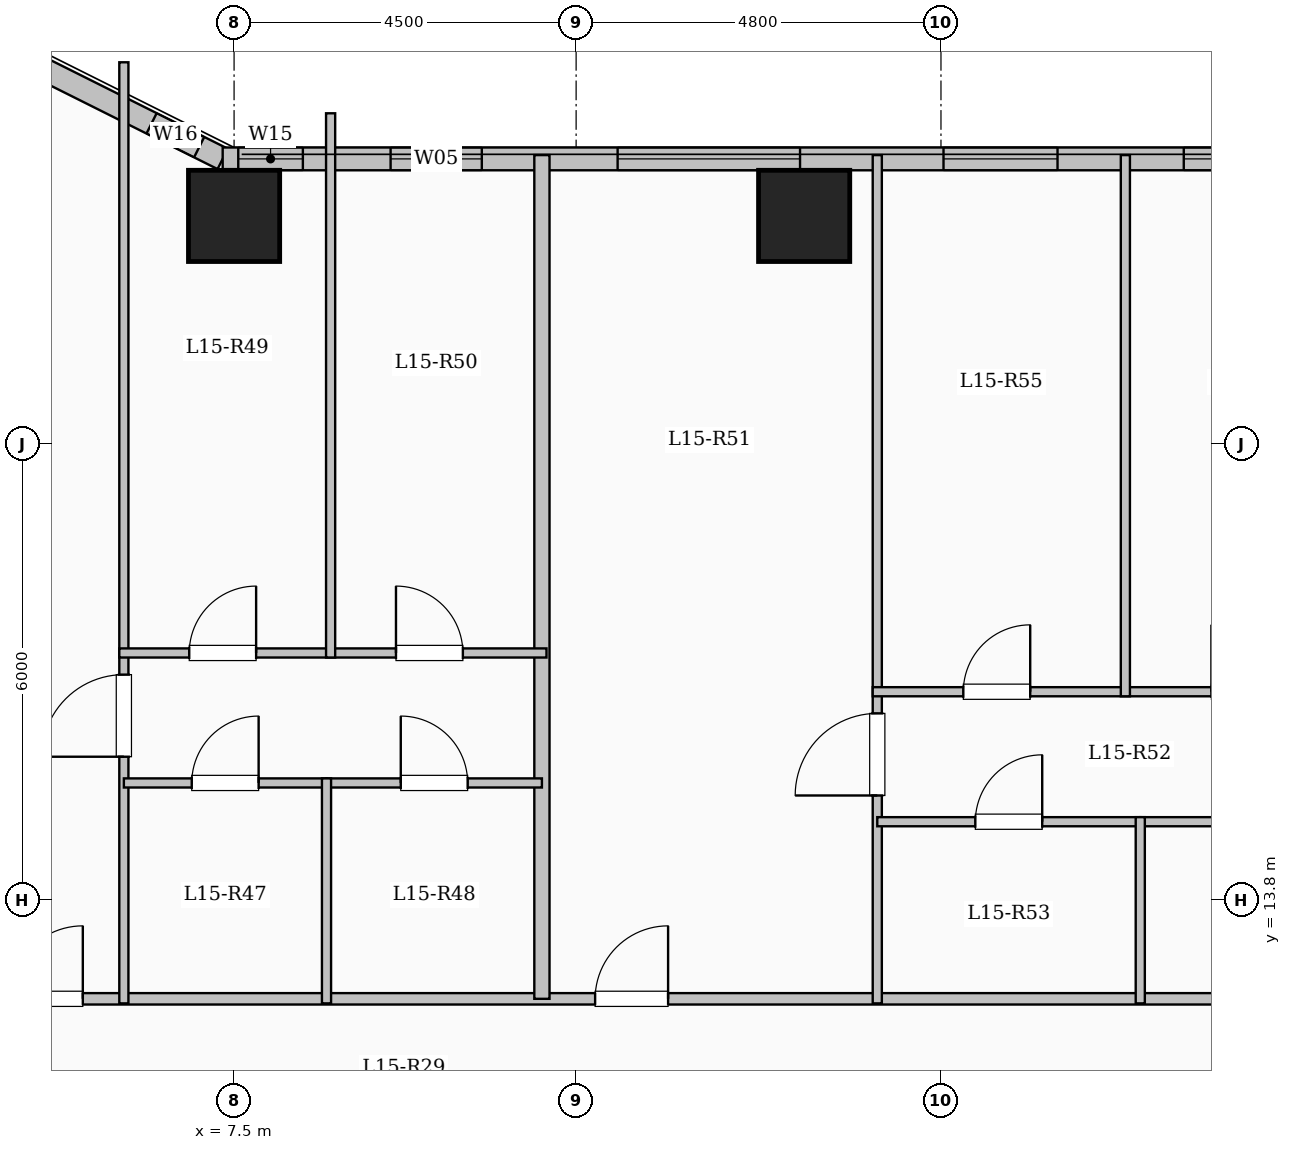
"""IFC4 building model, lengths in metres.
Left out: names, types, materials, properties, quantities, classifications, styles, units other than length and angle.
Written with IfcOpenShell. Run it as: python <this file> out.ifc"""

import sys

from ifc_helpers import new_model, si_unit, direction, frame, frame_2d, origin, origin_2d, place, context, subcontext, project, spatial, rectangle, extrude, element, fill, save


model = new_model("IFC4")
c1 = context("Model", 3, precision=1e-05, world=origin(), true_north=direction((0.0, 1.0)))
c2 = subcontext(c1, "Body", "Model", "MODEL_VIEW")
j1 = project(units=[si_unit("LENGTHUNIT", "METRE"), si_unit("PLANEANGLEUNIT", "RADIAN")], contexts=[c1])
p1 = place(None, origin())
s1 = spatial("IfcSite", under=j1, at=p1, CompositionType="ELEMENT")
p2 = place(p1, origin())
s2 = spatial("IfcBuilding", under=s1, at=p2, CompositionType="ELEMENT")
p3 = place(p2, frame((0.0, 0.0, 57.5)))
s3 = spatial("IfcBuildingStorey", under=s2, at=p3, CompositionType="ELEMENT", Elevation=57.5)
for number, where, z_axis, x_axis in (
    (1, (7.5, 22.8, 0.0), (0.0, 0.0, 1.0), (1.0, 0.0, 0.0)),
    (2, (15.0, 22.8, 0.0), (0.0, 0.0, 1.0), (1.0, 0.0, 0.0)),
):
    element("IfcColumn", number, at=place(p3, frame(where, z_axis=z_axis, x_axis=x_axis)), inside=s3, PredefinedType="COLUMN", context=c2, shape_type="SweptSolid", body=[
        extrude(rectangle(XDim=1.2, YDim=1.2, at=origin_2d()), origin(), (0.0, 0.0, 1.0), 3.35),
    ])
p4 = place(p3, frame((4.35, 25.05, 0.0), z_axis=(0.0, 0.0, 1.0), x_axis=(0.894427191, -0.4472135955, 0.0)))
e3 = element("IfcWall", 3, at=p4, inside=s3, PredefinedType="SOLIDWALL", context=c2, shape_type="SweptSolid", body=[
    extrude(rectangle(XDim=3.354, YDim=0.3, at=frame_2d((1.677, 0.0))), origin(), (0.0, 0.0, 1.0), 3.1),
])
p5 = place(p4, frame((2.308, 0.0, 0.95)))
e4 = element("IfcOpeningElement", 4, at=p5, cuts=e3, PredefinedType="OPENING", context=c2, shape_type="SweptSolid", body=[
    extrude(rectangle(XDim=0.7, YDim=1.5, at=frame_2d((0.35, 0.75))), frame((0.0, 0.16, 0.0), z_axis=(0.0, -1.0, 0.0), x_axis=(1.0, 0.0, 0.0)), (0.0, 0.0, 1.0), 0.32),
])
p6 = place(p3, frame((7.35, 23.55, 0.0), z_axis=(0.0, 0.0, 1.0), x_axis=(1.0, 0.0, 0.0)))
e5 = element("IfcWall", 5, at=p6, inside=s3, PredefinedType="SOLIDWALL", context=c2, shape_type="SweptSolid", body=[
    extrude(rectangle(XDim=15.3, YDim=0.3, at=frame_2d((7.65, 0.0))), origin(), (0.0, 0.0, 1.0), 3.1),
])
p7 = place(p6, frame((0.205, 0.0, 0.95)))
e6 = element("IfcOpeningElement", 6, at=p7, cuts=e5, PredefinedType="OPENING", context=c2, shape_type="SweptSolid", body=[
    extrude(rectangle(XDim=0.85, YDim=1.5, at=frame_2d((0.425, 0.75))), frame((0.0, 0.16, 0.0), z_axis=(0.0, -1.0, 0.0), x_axis=(1.0, 0.0, 0.0)), (0.0, 0.0, 1.0), 0.32),
])
p8 = place(p6, frame((2.209, 0.0, 0.95)))
e7 = element("IfcOpeningElement", 7, at=p8, cuts=e5, PredefinedType="OPENING", context=c2, shape_type="SweptSolid", body=[
    extrude(rectangle(XDim=1.2, YDim=1.5, at=frame_2d((0.6, 0.75))), frame((0.0, 0.16, 0.0), z_axis=(0.0, -1.0, 0.0), x_axis=(1.0, 0.0, 0.0)), (0.0, 0.0, 1.0), 0.32),
])
p9 = place(p6, frame((5.196, 0.0, 0.9)))
e8 = element("IfcOpeningElement", 8, at=p9, cuts=e5, PredefinedType="OPENING", context=c2, shape_type="SweptSolid", body=[
    extrude(rectangle(XDim=2.4, YDim=1.8, at=frame_2d((1.2, 0.9))), frame((0.0, 0.16, 0.0), z_axis=(0.0, -1.0, 0.0), x_axis=(1.0, 0.0, 0.0)), (0.0, 0.0, 1.0), 0.32),
])
p10 = place(p6, frame((9.483, 0.0, 0.9)))
e9 = element("IfcOpeningElement", 9, at=p10, cuts=e5, PredefinedType="OPENING", context=c2, shape_type="SweptSolid", body=[
    extrude(rectangle(XDim=1.5, YDim=1.65, at=frame_2d((0.75, 0.825))), frame((0.0, 0.16, 0.0), z_axis=(0.0, -1.0, 0.0), x_axis=(1.0, 0.0, 0.0)), (0.0, 0.0, 1.0), 0.32),
])
p11 = place(p6, frame((12.644, 0.0, 0.9)))
e10 = element("IfcOpeningElement", 10, at=p11, cuts=e5, PredefinedType="OPENING", context=c2, shape_type="SweptSolid", body=[
    extrude(rectangle(XDim=1.8, YDim=1.65, at=frame_2d((0.9, 0.825))), frame((0.0, 0.16, 0.0), z_axis=(0.0, -1.0, 0.0), x_axis=(1.0, 0.0, 0.0)), (0.0, 0.0, 1.0), 0.32),
])
p12 = place(p3, frame((3.85, 12.5, 0.0), z_axis=(0.0, 0.0, 1.0), x_axis=(1.0, 0.0, 0.0)))
e11 = element("IfcWall", 11, at=p12, inside=s3, PredefinedType="PARTITIONING", context=c2, shape_type="SweptSolid", body=[
    extrude(rectangle(XDim=18.7, YDim=0.15, at=frame_2d((9.35, 0.0))), origin(), (0.0, 0.0, 1.0), 3.1),
])
p13 = place(p12, frame((0.7, 0.0, 0.0)))
e12 = element("IfcOpeningElement", 12, at=p13, cuts=e11, PredefinedType="OPENING", context=c2, shape_type="SweptSolid", body=[
    extrude(rectangle(XDim=0.96, YDim=2.15, at=frame_2d((0.48, 1.075))), frame((0.0, 0.085, 0.0), z_axis=(0.0, -1.0, 0.0), x_axis=(1.0, 0.0, 0.0)), (0.0, 0.0, 1.0), 0.17),
])
p14 = place(p12, frame((8.4, 0.0, 0.0)))
e13 = element("IfcOpeningElement", 13, at=p14, cuts=e11, PredefinedType="OPENING", context=c2, shape_type="SweptSolid", body=[
    extrude(rectangle(XDim=0.96, YDim=2.15, at=frame_2d((0.48, 1.075))), frame((0.0, 0.085, 0.0), z_axis=(0.0, -1.0, 0.0), x_axis=(1.0, 0.0, 0.0)), (0.0, 0.0, 1.0), 0.17),
])
p15 = place(p3, frame((11.55, 12.5, 0.0), z_axis=(0.0, 0.0, 1.0), x_axis=(0.0, 1.0, 0.0)))
e14 = element("IfcWall", 14, at=p15, inside=s3, PredefinedType="SOLIDWALL", context=c2, shape_type="SweptSolid", body=[
    extrude(rectangle(XDim=11.1, YDim=0.2, at=frame_2d((5.55, 0.0))), origin(), (0.0, 0.0, 1.0), 3.1),
])
p16 = place(p3, frame((6.05, 12.44, 0.0), z_axis=(0.0, 0.0, 1.0), x_axis=(0.0, 1.0, 0.0)))
e15 = element("IfcWall", 15, at=p16, inside=s3, PredefinedType="PARTITIONING", context=c2, shape_type="SweptSolid", body=[
    extrude(rectangle(XDim=12.381, YDim=0.12, at=frame_2d((6.19, 0.0))), origin(), (0.0, 0.0, 1.0), 3.1),
])
p17 = place(p16, frame((3.245, 0.0, 0.0)))
e16 = element("IfcOpeningElement", 16, at=p17, cuts=e15, PredefinedType="OPENING", context=c2, shape_type="SweptSolid", body=[
    extrude(rectangle(XDim=1.08, YDim=2.15, at=frame_2d((0.54, 1.075))), frame((0.0, 0.07, 0.0), z_axis=(0.0, -1.0, 0.0), x_axis=(1.0, 0.0, 0.0)), (0.0, 0.0, 1.0), 0.14),
])
p18 = place(p3, frame((6.05, 15.34, 0.0), z_axis=(0.0, 0.0, 1.0), x_axis=(1.0, 0.0, 0.0)))
e17 = element("IfcWall", 17, at=p18, inside=s3, PredefinedType="PARTITIONING", context=c2, shape_type="SweptSolid", body=[
    extrude(rectangle(XDim=2.666, YDim=0.12, at=frame_2d((1.333, 0.0))), origin(), (0.0, 0.0, 1.0), 3.1),
])
p19 = place(p18, frame((0.893, 0.0, 0.0)))
e18 = element("IfcOpeningElement", 18, at=p19, cuts=e17, PredefinedType="OPENING", context=c2, shape_type="SweptSolid", body=[
    extrude(rectangle(XDim=0.88, YDim=2.1, at=frame_2d((0.44, 1.05))), frame((0.0, 0.07, 0.0), z_axis=(0.0, -1.0, 0.0), x_axis=(1.0, 0.0, 0.0)), (0.0, 0.0, 1.0), 0.14),
])
p20 = place(p3, frame((8.716, 15.34, 0.0), z_axis=(0.0, 0.0, 1.0), x_axis=(1.0, 0.0, 0.0)))
e19 = element("IfcWall", 19, at=p20, inside=s3, PredefinedType="PARTITIONING", context=c2, shape_type="SweptSolid", body=[
    extrude(rectangle(XDim=2.834, YDim=0.12, at=frame_2d((1.417, 0.0))), origin(), (0.0, 0.0, 1.0), 3.1),
])
p21 = place(p20, frame((0.977, 0.0, 0.0)))
e20 = element("IfcOpeningElement", 20, at=p21, cuts=e19, PredefinedType="OPENING", context=c2, shape_type="SweptSolid", body=[
    extrude(rectangle(XDim=0.88, YDim=2.1, at=frame_2d((0.44, 1.05))), frame((0.0, 0.07, 0.0), z_axis=(0.0, -1.0, 0.0), x_axis=(1.0, 0.0, 0.0)), (0.0, 0.0, 1.0), 0.14),
])
p22 = place(p3, frame((5.99, 17.05, 0.0), z_axis=(0.0, 0.0, 1.0), x_axis=(1.0, 0.0, 0.0)))
e21 = element("IfcWall", 21, at=p22, inside=s3, PredefinedType="PARTITIONING", context=c2, shape_type="SweptSolid", body=[
    extrude(rectangle(XDim=5.62, YDim=0.12, at=frame_2d((2.81, 0.0))), origin(), (0.0, 0.0, 1.0), 3.1),
])
p23 = place(p22, frame((0.92, 0.0, 0.0)))
e22 = element("IfcOpeningElement", 22, at=p23, cuts=e21, PredefinedType="OPENING", context=c2, shape_type="SweptSolid", body=[
    extrude(rectangle(XDim=0.88, YDim=2.1, at=frame_2d((0.44, 1.05))), frame((0.0, 0.07, 0.0), z_axis=(0.0, -1.0, 0.0), x_axis=(1.0, 0.0, 0.0)), (0.0, 0.0, 1.0), 0.14),
])
p24 = place(p22, frame((3.64, 0.0, 0.0)))
e23 = element("IfcOpeningElement", 23, at=p24, cuts=e21, PredefinedType="OPENING", context=c2, shape_type="SweptSolid", body=[
    extrude(rectangle(XDim=0.88, YDim=2.1, at=frame_2d((0.44, 1.05))), frame((0.0, 0.07, 0.0), z_axis=(0.0, -1.0, 0.0), x_axis=(1.0, 0.0, 0.0)), (0.0, 0.0, 1.0), 0.14),
])
p25 = place(p3, frame((8.716, 12.44, 0.0), z_axis=(0.0, 0.0, 1.0), x_axis=(0.0, 1.0, 0.0)))
e24 = element("IfcWall", 24, at=p25, inside=s3, PredefinedType="PARTITIONING", context=c2, shape_type="SweptSolid", body=[
    extrude(rectangle(XDim=2.96, YDim=0.12, at=frame_2d((1.48, 0.0))), origin(), (0.0, 0.0, 1.0), 3.1),
])
p26 = place(p3, frame((8.77, 16.99, 0.0), z_axis=(0.0, 0.0, 1.0), x_axis=(0.0, 1.0, 0.0)))
e25 = element("IfcWall", 25, at=p26, inside=s3, PredefinedType="PARTITIONING", context=c2, shape_type="SweptSolid", body=[
    extrude(rectangle(XDim=7.16, YDim=0.12, at=frame_2d((3.58, 0.0))), origin(), (0.0, 0.0, 1.0), 3.1),
])
p27 = place(p3, frame((15.962, 12.44, 0.0), z_axis=(0.0, 0.0, 1.0), x_axis=(0.0, 1.0, 0.0)))
e26 = element("IfcWall", 26, at=p27, inside=s3, PredefinedType="PARTITIONING", context=c2, shape_type="SweptSolid", body=[
    extrude(rectangle(XDim=11.16, YDim=0.12, at=frame_2d((5.58, 0.0))), origin(), (0.0, 0.0, 1.0), 3.1),
])
p28 = place(p27, frame((2.735, 0.0, 0.0)))
e27 = element("IfcOpeningElement", 27, at=p28, cuts=e26, PredefinedType="OPENING", context=c2, shape_type="SweptSolid", body=[
    extrude(rectangle(XDim=1.08, YDim=2.15, at=frame_2d((0.54, 1.075))), frame((0.0, 0.07, 0.0), z_axis=(0.0, -1.0, 0.0), x_axis=(1.0, 0.0, 0.0)), (0.0, 0.0, 1.0), 0.14),
])
p29 = place(p3, frame((15.962, 14.83, 0.0), z_axis=(0.0, 0.0, 1.0), x_axis=(1.0, 0.0, 0.0)))
e28 = element("IfcWall", 28, at=p29, inside=s3, PredefinedType="PARTITIONING", context=c2, shape_type="SweptSolid", body=[
    extrude(rectangle(XDim=3.46, YDim=0.12, at=frame_2d((1.73, 0.0))), origin(), (0.0, 0.0, 1.0), 3.1),
])
p30 = place(p29, frame((1.29, 0.0, 0.0)))
e29 = element("IfcOpeningElement", 29, at=p30, cuts=e28, PredefinedType="OPENING", context=c2, shape_type="SweptSolid", body=[
    extrude(rectangle(XDim=0.88, YDim=2.1, at=frame_2d((0.44, 1.05))), frame((0.0, 0.07, 0.0), z_axis=(0.0, -1.0, 0.0), x_axis=(1.0, 0.0, 0.0)), (0.0, 0.0, 1.0), 0.14),
])
p31 = place(p3, frame((19.422, 14.83, 0.0), z_axis=(0.0, 0.0, 1.0), x_axis=(1.0, 0.0, 0.0)))
e30 = element("IfcWall", 30, at=p31, inside=s3, PredefinedType="PARTITIONING", context=c2, shape_type="SweptSolid", body=[
    extrude(rectangle(XDim=3.128, YDim=0.12, at=frame_2d((1.564, 0.0))), origin(), (0.0, 0.0, 1.0), 3.1),
])
p32 = place(p31, frame((1.124, 0.0, 0.0)))
e31 = element("IfcOpeningElement", 31, at=p32, cuts=e30, PredefinedType="OPENING", context=c2, shape_type="SweptSolid", body=[
    extrude(rectangle(XDim=0.88, YDim=2.1, at=frame_2d((0.44, 1.05))), frame((0.0, 0.07, 0.0), z_axis=(0.0, -1.0, 0.0), x_axis=(1.0, 0.0, 0.0)), (0.0, 0.0, 1.0), 0.14),
])
p33 = place(p3, frame((15.902, 16.54, 0.0), z_axis=(0.0, 0.0, 1.0), x_axis=(1.0, 0.0, 0.0)))
e32 = element("IfcWall", 32, at=p33, inside=s3, PredefinedType="PARTITIONING", context=c2, shape_type="SweptSolid", body=[
    extrude(rectangle(XDim=6.708, YDim=0.12, at=frame_2d((3.354, 0.0))), origin(), (0.0, 0.0, 1.0), 3.1),
])
p34 = place(p33, frame((1.192, 0.0, 0.0)))
e33 = element("IfcOpeningElement", 33, at=p34, cuts=e32, PredefinedType="OPENING", context=c2, shape_type="SweptSolid", body=[
    extrude(rectangle(XDim=0.88, YDim=2.1, at=frame_2d((0.44, 1.05))), frame((0.0, 0.07, 0.0), z_axis=(0.0, -1.0, 0.0), x_axis=(1.0, 0.0, 0.0)), (0.0, 0.0, 1.0), 0.14),
])
p35 = place(p33, frame((4.456, 0.0, 0.0)))
e34 = element("IfcOpeningElement", 34, at=p35, cuts=e32, PredefinedType="OPENING", context=c2, shape_type="SweptSolid", body=[
    extrude(rectangle(XDim=0.88, YDim=2.1, at=frame_2d((0.44, 1.05))), frame((0.0, 0.07, 0.0), z_axis=(0.0, -1.0, 0.0), x_axis=(1.0, 0.0, 0.0)), (0.0, 0.0, 1.0), 0.14),
])
p36 = place(p3, frame((19.422, 12.44, 0.0), z_axis=(0.0, 0.0, 1.0), x_axis=(0.0, 1.0, 0.0)))
e35 = element("IfcWall", 35, at=p36, inside=s3, PredefinedType="PARTITIONING", context=c2, shape_type="SweptSolid", body=[
    extrude(rectangle(XDim=2.45, YDim=0.12, at=frame_2d((1.225, 0.0))), origin(), (0.0, 0.0, 1.0), 3.1),
])
p37 = place(p3, frame((19.226, 16.48, 0.0), z_axis=(0.0, 0.0, 1.0), x_axis=(0.0, 1.0, 0.0)))
e36 = element("IfcWall", 36, at=p37, inside=s3, PredefinedType="PARTITIONING", context=c2, shape_type="SweptSolid", body=[
    extrude(rectangle(XDim=7.12, YDim=0.12, at=frame_2d((3.56, 0.0))), origin(), (0.0, 0.0, 1.0), 3.1),
])
p38 = place(p5, origin())
e37 = element("IfcWindow", 37, at=p38, inside=s3, PartitioningType="SINGLE_PANEL", PredefinedType="WINDOW", context=c2, shape_type="SweptSolid", body=[
    extrude(rectangle(XDim=0.7, YDim=1.5, at=frame_2d((0.35, 0.75))), frame((0.0, 0.03, 0.0), z_axis=(0.0, -1.0, 0.0), x_axis=(1.0, 0.0, 0.0)), (0.0, 0.0, 1.0), 0.06),
])
fill(e4, e37)
p39 = place(p7, origin())
e38 = element("IfcWindow", 38, at=p39, inside=s3, PartitioningType="SINGLE_PANEL", PredefinedType="WINDOW", context=c2, shape_type="SweptSolid", body=[
    extrude(rectangle(XDim=0.85, YDim=1.5, at=frame_2d((0.425, 0.75))), frame((0.0, 0.03, 0.0), z_axis=(0.0, -1.0, 0.0), x_axis=(1.0, 0.0, 0.0)), (0.0, 0.0, 1.0), 0.06),
])
fill(e6, e38)
p40 = place(p8, origin())
e39 = element("IfcWindow", 39, at=p40, inside=s3, PartitioningType="SINGLE_PANEL", PredefinedType="WINDOW", context=c2, shape_type="SweptSolid", body=[
    extrude(rectangle(XDim=1.2, YDim=1.5, at=frame_2d((0.6, 0.75))), frame((0.0, 0.03, 0.0), z_axis=(0.0, -1.0, 0.0), x_axis=(1.0, 0.0, 0.0)), (0.0, 0.0, 1.0), 0.06),
])
fill(e7, e39)
p41 = place(p9, origin())
e40 = element("IfcWindow", 40, at=p41, inside=s3, PartitioningType="SINGLE_PANEL", PredefinedType="WINDOW", context=c2, shape_type="SweptSolid", body=[
    extrude(rectangle(XDim=2.4, YDim=1.8, at=frame_2d((1.2, 0.9))), frame((0.0, 0.03, 0.0), z_axis=(0.0, -1.0, 0.0), x_axis=(1.0, 0.0, 0.0)), (0.0, 0.0, 1.0), 0.06),
])
fill(e8, e40)
p42 = place(p10, origin())
e41 = element("IfcWindow", 41, at=p42, inside=s3, PartitioningType="SINGLE_PANEL", PredefinedType="WINDOW", context=c2, shape_type="SweptSolid", body=[
    extrude(rectangle(XDim=1.5, YDim=1.65, at=frame_2d((0.75, 0.825))), frame((0.0, 0.03, 0.0), z_axis=(0.0, -1.0, 0.0), x_axis=(1.0, 0.0, 0.0)), (0.0, 0.0, 1.0), 0.06),
])
fill(e9, e41)
p43 = place(p11, origin())
e42 = element("IfcWindow", 42, at=p43, inside=s3, PartitioningType="SINGLE_PANEL", PredefinedType="WINDOW", context=c2, shape_type="SweptSolid", body=[
    extrude(rectangle(XDim=1.8, YDim=1.65, at=frame_2d((0.9, 0.825))), frame((0.0, 0.03, 0.0), z_axis=(0.0, -1.0, 0.0), x_axis=(1.0, 0.0, 0.0)), (0.0, 0.0, 1.0), 0.06),
])
fill(e10, e42)
p44 = place(p13, origin())
e43 = element("IfcDoor", 43, at=p44, inside=s3, OperationType="SINGLE_SWING_RIGHT", PredefinedType="DOOR", context=c2, shape_type="SweptSolid", body=[
    extrude(rectangle(XDim=0.96, YDim=2.15, at=frame_2d((0.48, 1.075))), frame((0.0, 0.025, 0.0), z_axis=(0.0, -1.0, 0.0), x_axis=(1.0, 0.0, 0.0)), (0.0, 0.0, 1.0), 0.05),
])
fill(e12, e43)
p45 = place(p17, origin())
e44 = element("IfcDoor", 44, at=p45, inside=s3, OperationType="SINGLE_SWING_LEFT", PredefinedType="DOOR", context=c2, shape_type="SweptSolid", body=[
    extrude(rectangle(XDim=1.08, YDim=2.15, at=frame_2d((0.54, 1.075))), frame((0.0, 0.025, 0.0), z_axis=(0.0, -1.0, 0.0), x_axis=(1.0, 0.0, 0.0)), (0.0, 0.0, 1.0), 0.05),
])
fill(e16, e44)
p46 = place(p19, origin())
e45 = element("IfcDoor", 45, at=p46, inside=s3, OperationType="SINGLE_SWING_RIGHT", PredefinedType="DOOR", context=c2, shape_type="SweptSolid", body=[
    extrude(rectangle(XDim=0.88, YDim=2.1, at=frame_2d((0.44, 1.05))), frame((0.0, 0.025, 0.0), z_axis=(0.0, -1.0, 0.0), x_axis=(1.0, 0.0, 0.0)), (0.0, 0.0, 1.0), 0.05),
])
fill(e18, e45)
p47 = place(p21, origin())
e46 = element("IfcDoor", 46, at=p47, inside=s3, OperationType="SINGLE_SWING_LEFT", PredefinedType="DOOR", context=c2, shape_type="SweptSolid", body=[
    extrude(rectangle(XDim=0.88, YDim=2.1, at=frame_2d((0.44, 1.05))), frame((0.0, 0.025, 0.0), z_axis=(0.0, -1.0, 0.0), x_axis=(1.0, 0.0, 0.0)), (0.0, 0.0, 1.0), 0.05),
])
fill(e20, e46)
p48 = place(p23, origin())
e47 = element("IfcDoor", 47, at=p48, inside=s3, OperationType="SINGLE_SWING_RIGHT", PredefinedType="DOOR", context=c2, shape_type="SweptSolid", body=[
    extrude(rectangle(XDim=0.88, YDim=2.1, at=frame_2d((0.44, 1.05))), frame((0.0, 0.025, 0.0), z_axis=(0.0, -1.0, 0.0), x_axis=(1.0, 0.0, 0.0)), (0.0, 0.0, 1.0), 0.05),
])
fill(e22, e47)
p49 = place(p24, origin())
e48 = element("IfcDoor", 48, at=p49, inside=s3, OperationType="SINGLE_SWING_LEFT", PredefinedType="DOOR", context=c2, shape_type="SweptSolid", body=[
    extrude(rectangle(XDim=0.88, YDim=2.1, at=frame_2d((0.44, 1.05))), frame((0.0, 0.025, 0.0), z_axis=(0.0, -1.0, 0.0), x_axis=(1.0, 0.0, 0.0)), (0.0, 0.0, 1.0), 0.05),
])
fill(e23, e48)
p50 = place(p14, origin())
e49 = element("IfcDoor", 49, at=p50, inside=s3, OperationType="SINGLE_SWING_RIGHT", PredefinedType="DOOR", context=c2, shape_type="SweptSolid", body=[
    extrude(rectangle(XDim=0.96, YDim=2.15, at=frame_2d((0.48, 1.075))), frame((0.0, 0.025, 0.0), z_axis=(0.0, -1.0, 0.0), x_axis=(1.0, 0.0, 0.0)), (0.0, 0.0, 1.0), 0.05),
])
fill(e13, e49)
p51 = place(p28, origin())
e50 = element("IfcDoor", 50, at=p51, inside=s3, OperationType="SINGLE_SWING_LEFT", PredefinedType="DOOR", context=c2, shape_type="SweptSolid", body=[
    extrude(rectangle(XDim=1.08, YDim=2.15, at=frame_2d((0.54, 1.075))), frame((0.0, 0.025, 0.0), z_axis=(0.0, -1.0, 0.0), x_axis=(1.0, 0.0, 0.0)), (0.0, 0.0, 1.0), 0.05),
])
fill(e27, e50)
p52 = place(p30, origin())
e51 = element("IfcDoor", 51, at=p52, inside=s3, OperationType="SINGLE_SWING_RIGHT", PredefinedType="DOOR", context=c2, shape_type="SweptSolid", body=[
    extrude(rectangle(XDim=0.88, YDim=2.1, at=frame_2d((0.44, 1.05))), frame((0.0, 0.025, 0.0), z_axis=(0.0, -1.0, 0.0), x_axis=(1.0, 0.0, 0.0)), (0.0, 0.0, 1.0), 0.05),
])
fill(e29, e51)
p53 = place(p34, origin())
e52 = element("IfcDoor", 52, at=p53, inside=s3, OperationType="SINGLE_SWING_RIGHT", PredefinedType="DOOR", context=c2, shape_type="SweptSolid", body=[
    extrude(rectangle(XDim=0.88, YDim=2.1, at=frame_2d((0.44, 1.05))), frame((0.0, 0.025, 0.0), z_axis=(0.0, -1.0, 0.0), x_axis=(1.0, 0.0, 0.0)), (0.0, 0.0, 1.0), 0.05),
])
fill(e33, e52)
p54 = place(p35, origin())
e53 = element("IfcDoor", 53, at=p54, inside=s3, OperationType="SINGLE_SWING_LEFT", PredefinedType="DOOR", context=c2, shape_type="SweptSolid", body=[
    extrude(rectangle(XDim=0.88, YDim=2.1, at=frame_2d((0.44, 1.05))), frame((0.0, 0.025, 0.0), z_axis=(0.0, -1.0, 0.0), x_axis=(1.0, 0.0, 0.0)), (0.0, 0.0, 1.0), 0.05),
])
fill(e34, e53)
save(model, sys.argv[1])
